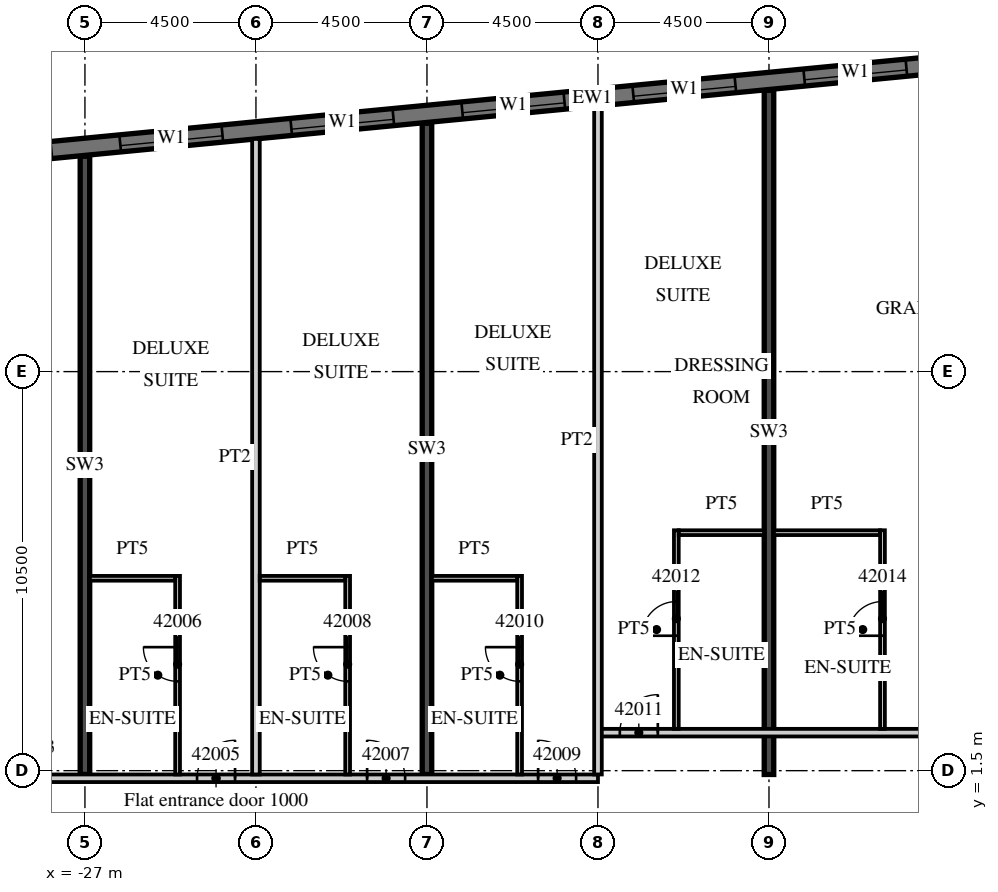
"""IFC4 building model, lengths in metres.
Left out: names, types, materials, properties, quantities, classifications, styles, units other than length and angle.
Written with IfcOpenShell. Run it as: python <this file> out.ifc"""

import sys

from ifc_helpers import new_model, si_unit, direction, frame, frame_2d, origin, place, context, subcontext, project, spatial, rectangle, extrude, element, fill, save


model = new_model("IFC4")
c1 = context("Model", 3, precision=1e-05, world=origin(), true_north=direction((0.0, 1.0)))
c2 = subcontext(c1, "Body", "Model", "MODEL_VIEW")
j1 = project(units=[si_unit("LENGTHUNIT", "METRE"), si_unit("PLANEANGLEUNIT", "RADIAN")], contexts=[c1])
p1 = place(None, origin())
s1 = spatial("IfcSite", under=j1, at=p1, CompositionType="ELEMENT")
p2 = place(p1, origin())
s2 = spatial("IfcBuilding", under=s1, at=p2, CompositionType="ELEMENT")
p3 = place(p2, frame((0.0, 0.0, 180.1)))
s3 = spatial("IfcBuildingStorey", under=s2, at=p3, CompositionType="ELEMENT", Elevation=180.1)
p4 = place(p3, frame((-27.0, 1.4, 0.0), z_axis=(0.0, 0.0, 1.0), x_axis=(0.0, 1.0, 0.0)))
e1 = element("IfcWall", 1, at=p4, inside=s3, PredefinedType="SHEAR", context=c2, shape_type="SweptSolid", body=[
    extrude(rectangle(XDim=16.268, YDim=0.25, at=frame_2d((8.134, 0.0))), origin(), (0.0, 0.0, 1.0), 3.3),
])
p5 = place(p3, frame((-18.0, 1.4, 0.0), z_axis=(0.0, 0.0, 1.0), x_axis=(0.0, 1.0, 0.0)))
e2 = element("IfcWall", 2, at=p5, inside=s3, PredefinedType="SHEAR", context=c2, shape_type="SweptSolid", body=[
    extrude(rectangle(XDim=17.134, YDim=0.25, at=frame_2d((8.567, 0.0))), origin(), (0.0, 0.0, 1.0), 3.3),
])
p6 = place(p3, frame((-9.0, 1.4, 0.0), z_axis=(0.0, 0.0, 1.0), x_axis=(0.0, 1.0, 0.0)))
e3 = element("IfcWall", 3, at=p6, inside=s3, PredefinedType="SHEAR", context=c2, shape_type="SweptSolid", body=[
    extrude(rectangle(XDim=18.001, YDim=0.25, at=frame_2d((9.0, 0.0))), origin(), (0.0, 0.0, 1.0), 3.3),
])
p7 = place(p3, frame((13.521, 21.817, 0.0), z_axis=(0.0, 0.0, 1.0), x_axis=(-0.995396508751, -0.095842529008, 0.0)))
e4 = element("IfcWall", 4, at=p7, inside=s3, PredefinedType="SOLIDWALL", context=c2, shape_type="SweptSolid", body=[
    extrude(rectangle(XDim=54.591, YDim=0.45, at=frame_2d((27.296, 0.0))), origin(), (0.0, 0.0, 1.0), 3.02),
])
p8 = place(p7, frame((0.91, 0.0, 0.45)))
e5 = element("IfcOpeningElement", 5, at=p8, cuts=e4, PredefinedType="OPENING", context=c2, shape_type="SweptSolid", body=[
    extrude(rectangle(XDim=2.7, YDim=2.25, at=frame_2d((1.35, 1.125))), frame((0.0, 0.235, 0.0), z_axis=(0.0, -1.0, 0.0), x_axis=(1.0, 0.0, 0.0)), (0.0, 0.0, 1.0), 0.47),
])
p9 = place(p7, frame((5.431, 0.0, 0.45)))
e6 = element("IfcOpeningElement", 6, at=p9, cuts=e4, PredefinedType="OPENING", context=c2, shape_type="SweptSolid", body=[
    extrude(rectangle(XDim=2.7, YDim=2.25, at=frame_2d((1.35, 1.125))), frame((0.0, 0.235, 0.0), z_axis=(0.0, -1.0, 0.0), x_axis=(1.0, 0.0, 0.0)), (0.0, 0.0, 1.0), 0.47),
])
p10 = place(p7, frame((9.952, 0.0, 0.45)))
e7 = element("IfcOpeningElement", 7, at=p10, cuts=e4, PredefinedType="OPENING", context=c2, shape_type="SweptSolid", body=[
    extrude(rectangle(XDim=2.7, YDim=2.25, at=frame_2d((1.35, 1.125))), frame((0.0, 0.235, 0.0), z_axis=(0.0, -1.0, 0.0), x_axis=(1.0, 0.0, 0.0)), (0.0, 0.0, 1.0), 0.47),
])
p11 = place(p7, frame((14.473, 0.0, 0.45)))
e8 = element("IfcOpeningElement", 8, at=p11, cuts=e4, PredefinedType="OPENING", context=c2, shape_type="SweptSolid", body=[
    extrude(rectangle(XDim=2.7, YDim=2.25, at=frame_2d((1.35, 1.125))), frame((0.0, 0.235, 0.0), z_axis=(0.0, -1.0, 0.0), x_axis=(1.0, 0.0, 0.0)), (0.0, 0.0, 1.0), 0.47),
])
p12 = place(p7, frame((18.994, 0.0, 0.45)))
e9 = element("IfcOpeningElement", 9, at=p12, cuts=e4, PredefinedType="OPENING", context=c2, shape_type="SweptSolid", body=[
    extrude(rectangle(XDim=2.7, YDim=2.25, at=frame_2d((1.35, 1.125))), frame((0.0, 0.235, 0.0), z_axis=(0.0, -1.0, 0.0), x_axis=(1.0, 0.0, 0.0)), (0.0, 0.0, 1.0), 0.47),
])
p13 = place(p7, frame((23.514, 0.0, 0.45)))
e10 = element("IfcOpeningElement", 10, at=p13, cuts=e4, PredefinedType="OPENING", context=c2, shape_type="SweptSolid", body=[
    extrude(rectangle(XDim=2.7, YDim=2.25, at=frame_2d((1.35, 1.125))), frame((0.0, 0.235, 0.0), z_axis=(0.0, -1.0, 0.0), x_axis=(1.0, 0.0, 0.0)), (0.0, 0.0, 1.0), 0.47),
])
p14 = place(p7, frame((28.035, 0.0, 0.45)))
e11 = element("IfcOpeningElement", 11, at=p14, cuts=e4, PredefinedType="OPENING", context=c2, shape_type="SweptSolid", body=[
    extrude(rectangle(XDim=2.7, YDim=2.25, at=frame_2d((1.35, 1.125))), frame((0.0, 0.235, 0.0), z_axis=(0.0, -1.0, 0.0), x_axis=(1.0, 0.0, 0.0)), (0.0, 0.0, 1.0), 0.47),
])
p15 = place(p7, frame((32.556, 0.0, 0.45)))
e12 = element("IfcOpeningElement", 12, at=p15, cuts=e4, PredefinedType="OPENING", context=c2, shape_type="SweptSolid", body=[
    extrude(rectangle(XDim=2.7, YDim=2.25, at=frame_2d((1.35, 1.125))), frame((0.0, 0.235, 0.0), z_axis=(0.0, -1.0, 0.0), x_axis=(1.0, 0.0, 0.0)), (0.0, 0.0, 1.0), 0.47),
])
p16 = place(p7, frame((37.077, 0.0, 0.45)))
e13 = element("IfcOpeningElement", 13, at=p16, cuts=e4, PredefinedType="OPENING", context=c2, shape_type="SweptSolid", body=[
    extrude(rectangle(XDim=2.7, YDim=2.25, at=frame_2d((1.35, 1.125))), frame((0.0, 0.235, 0.0), z_axis=(0.0, -1.0, 0.0), x_axis=(1.0, 0.0, 0.0)), (0.0, 0.0, 1.0), 0.47),
])
p17 = place(p7, frame((41.598, 0.0, 0.45)))
e14 = element("IfcOpeningElement", 14, at=p17, cuts=e4, PredefinedType="OPENING", context=c2, shape_type="SweptSolid", body=[
    extrude(rectangle(XDim=2.7, YDim=2.25, at=frame_2d((1.35, 1.125))), frame((0.0, 0.235, 0.0), z_axis=(0.0, -1.0, 0.0), x_axis=(1.0, 0.0, 0.0)), (0.0, 0.0, 1.0), 0.47),
])
p18 = place(p7, frame((46.118, 0.0, 0.45)))
e15 = element("IfcOpeningElement", 15, at=p18, cuts=e4, PredefinedType="OPENING", context=c2, shape_type="SweptSolid", body=[
    extrude(rectangle(XDim=2.7, YDim=2.25, at=frame_2d((1.35, 1.125))), frame((0.0, 0.235, 0.0), z_axis=(0.0, -1.0, 0.0), x_axis=(1.0, 0.0, 0.0)), (0.0, 0.0, 1.0), 0.47),
])
p19 = place(p7, frame((50.629, 0.0, 0.45)))
e16 = element("IfcOpeningElement", 16, at=p19, cuts=e4, PredefinedType="OPENING", context=c2, shape_type="SweptSolid", body=[
    extrude(rectangle(XDim=2.7, YDim=2.25, at=frame_2d((1.35, 1.125))), frame((0.0, 0.235, 0.0), z_axis=(0.0, -1.0, 0.0), x_axis=(1.0, 0.0, 0.0)), (0.0, 0.0, 1.0), 0.47),
])
p20 = place(p3, frame((-42.913, 1.3, 0.0), z_axis=(0.0, 0.0, 1.0), x_axis=(1.0, 0.0, 0.0)))
e17 = element("IfcWall", 17, at=p20, inside=s3, PredefinedType="PARTITIONING", context=c2, shape_type="SweptSolid", body=[
    extrude(rectangle(XDim=29.413, YDim=0.2, at=frame_2d((14.707, 0.0))), origin(), (0.0, 0.0, 1.0), 3.02),
])
p21 = place(p20, frame((1.406, 0.0, 0.0)))
e18 = element("IfcOpeningElement", 18, at=p21, cuts=e17, PredefinedType="OPENING", context=c2, shape_type="SweptSolid", body=[
    extrude(rectangle(XDim=1.2, YDim=2.1, at=frame_2d((0.6, 1.05))), frame((0.0, 0.11, 0.0), z_axis=(0.0, -1.0, 0.0), x_axis=(1.0, 0.0, 0.0)), (0.0, 0.0, 1.0), 0.22),
])
p22 = place(p20, frame((12.275, 0.0, 0.0)))
e19 = element("IfcOpeningElement", 19, at=p22, cuts=e17, PredefinedType="OPENING", context=c2, shape_type="SweptSolid", body=[
    extrude(rectangle(XDim=1.2, YDim=2.1, at=frame_2d((0.6, 1.05))), frame((0.0, 0.11, 0.0), z_axis=(0.0, -1.0, 0.0), x_axis=(1.0, 0.0, 0.0)), (0.0, 0.0, 1.0), 0.22),
])
p23 = place(p20, frame((18.863, 0.0, 0.0)))
e20 = element("IfcOpeningElement", 20, at=p23, cuts=e17, PredefinedType="OPENING", context=c2, shape_type="SweptSolid", body=[
    extrude(rectangle(XDim=1.0, YDim=2.1, at=frame_2d((0.5, 1.05))), frame((0.0, 0.11, 0.0), z_axis=(0.0, -1.0, 0.0), x_axis=(1.0, 0.0, 0.0)), (0.0, 0.0, 1.0), 0.22),
])
p24 = place(p20, frame((23.338, 0.0, 0.0)))
e21 = element("IfcOpeningElement", 21, at=p24, cuts=e17, PredefinedType="OPENING", context=c2, shape_type="SweptSolid", body=[
    extrude(rectangle(XDim=1.0, YDim=2.1, at=frame_2d((0.5, 1.05))), frame((0.0, 0.11, 0.0), z_axis=(0.0, -1.0, 0.0), x_axis=(1.0, 0.0, 0.0)), (0.0, 0.0, 1.0), 0.22),
])
p25 = place(p20, frame((27.838, 0.0, 0.0)))
e22 = element("IfcOpeningElement", 22, at=p25, cuts=e17, PredefinedType="OPENING", context=c2, shape_type="SweptSolid", body=[
    extrude(rectangle(XDim=1.0, YDim=2.1, at=frame_2d((0.5, 1.05))), frame((0.0, 0.11, 0.0), z_axis=(0.0, -1.0, 0.0), x_axis=(1.0, 0.0, 0.0)), (0.0, 0.0, 1.0), 0.22),
])
p26 = place(p3, frame((-13.5, 2.5, 0.0), z_axis=(0.0, 0.0, 1.0), x_axis=(1.0, 0.0, 0.0)))
e23 = element("IfcWall", 23, at=p26, inside=s3, PredefinedType="PARTITIONING", context=c2, shape_type="SweptSolid", body=[
    extrude(rectangle(XDim=27.0, YDim=0.2, at=frame_2d((13.5, 0.0))), origin(), (0.0, 0.0, 1.0), 3.02),
])
p27 = place(p26, frame((0.575, 0.0, 0.0)))
e24 = element("IfcOpeningElement", 24, at=p27, cuts=e23, PredefinedType="OPENING", context=c2, shape_type="SweptSolid", body=[
    extrude(rectangle(XDim=1.0, YDim=2.1, at=frame_2d((0.5, 1.05))), frame((0.0, 0.11, 0.0), z_axis=(0.0, -1.0, 0.0), x_axis=(1.0, 0.0, 0.0)), (0.0, 0.0, 1.0), 0.22),
])
p28 = place(p26, frame((9.863, 0.0, 0.0)))
e25 = element("IfcOpeningElement", 25, at=p28, cuts=e23, PredefinedType="OPENING", context=c2, shape_type="SweptSolid", body=[
    extrude(rectangle(XDim=1.2, YDim=2.1, at=frame_2d((0.6, 1.05))), frame((0.0, 0.11, 0.0), z_axis=(0.0, -1.0, 0.0), x_axis=(1.0, 0.0, 0.0)), (0.0, 0.0, 1.0), 0.22),
])
p29 = place(p26, frame((15.938, 0.0, 0.0)))
e26 = element("IfcOpeningElement", 26, at=p29, cuts=e23, PredefinedType="OPENING", context=c2, shape_type="SweptSolid", body=[
    extrude(rectangle(XDim=1.2, YDim=2.1, at=frame_2d((0.6, 1.05))), frame((0.0, 0.11, 0.0), z_axis=(0.0, -1.0, 0.0), x_axis=(1.0, 0.0, 0.0)), (0.0, 0.0, 1.0), 0.22),
])
p30 = place(p26, frame((25.425, 0.0, 0.0)))
e27 = element("IfcOpeningElement", 27, at=p30, cuts=e23, PredefinedType="OPENING", context=c2, shape_type="SweptSolid", body=[
    extrude(rectangle(XDim=1.0, YDim=2.1, at=frame_2d((0.5, 1.05))), frame((0.0, 0.11, 0.0), z_axis=(0.0, -1.0, 0.0), x_axis=(1.0, 0.0, 0.0)), (0.0, 0.0, 1.0), 0.22),
])
p31 = place(p3, frame((-22.5, 1.4, 0.0), z_axis=(0.0, 0.0, 1.0), x_axis=(0.0, 1.0, 0.0)))
e28 = element("IfcWall", 28, at=p31, inside=s3, PredefinedType="PARTITIONING", context=c2, shape_type="SweptSolid", body=[
    extrude(rectangle(XDim=16.723, YDim=0.2, at=frame_2d((8.362, 0.0))), origin(), (0.0, 0.0, 1.0), 3.02),
])
p32 = place(p3, frame((-24.562, 1.4, 0.0), z_axis=(0.0, 0.0, 1.0), x_axis=(0.0, 1.0, 0.0)))
e29 = element("IfcWall", 29, at=p32, inside=s3, PredefinedType="PARTITIONING", context=c2, shape_type="SweptSolid", body=[
    extrude(rectangle(XDim=5.225, YDim=0.125, at=frame_2d((2.613, 0.0))), origin(), (0.0, 0.0, 1.0), 3.02),
])
p33 = place(p32, frame((2.45, 0.0, 0.0)))
e30 = element("IfcOpeningElement", 30, at=p33, cuts=e29, PredefinedType="OPENING", context=c2, shape_type="SweptSolid", body=[
    extrude(rectangle(XDim=0.9, YDim=2.1, at=frame_2d((0.45, 1.05))), frame((0.0, 0.073, 0.0), z_axis=(0.0, -1.0, 0.0), x_axis=(1.0, 0.0, 0.0)), (0.0, 0.0, 1.0), 0.145),
])
p34 = place(p3, frame((-26.875, 6.562, 0.0), z_axis=(0.0, 0.0, 1.0), x_axis=(1.0, 0.0, 0.0)))
e31 = element("IfcWall", 31, at=p34, inside=s3, PredefinedType="PARTITIONING", context=c2, shape_type="SweptSolid", body=[
    extrude(rectangle(XDim=2.25, YDim=0.125, at=frame_2d((1.125, 0.0))), origin(), (0.0, 0.0, 1.0), 3.02),
])
p35 = place(p3, frame((-20.087, 1.4, 0.0), z_axis=(0.0, 0.0, 1.0), x_axis=(0.0, 1.0, 0.0)))
e32 = element("IfcWall", 32, at=p35, inside=s3, PredefinedType="PARTITIONING", context=c2, shape_type="SweptSolid", body=[
    extrude(rectangle(XDim=5.225, YDim=0.125, at=frame_2d((2.613, 0.0))), origin(), (0.0, 0.0, 1.0), 3.02),
])
p36 = place(p35, frame((2.45, 0.0, 0.0)))
e33 = element("IfcOpeningElement", 33, at=p36, cuts=e32, PredefinedType="OPENING", context=c2, shape_type="SweptSolid", body=[
    extrude(rectangle(XDim=0.9, YDim=2.1, at=frame_2d((0.45, 1.05))), frame((0.0, 0.073, 0.0), z_axis=(0.0, -1.0, 0.0), x_axis=(1.0, 0.0, 0.0)), (0.0, 0.0, 1.0), 0.145),
])
p37 = place(p3, frame((-22.4, 6.562, 0.0), z_axis=(0.0, 0.0, 1.0), x_axis=(1.0, 0.0, 0.0)))
e34 = element("IfcWall", 34, at=p37, inside=s3, PredefinedType="PARTITIONING", context=c2, shape_type="SweptSolid", body=[
    extrude(rectangle(XDim=2.25, YDim=0.125, at=frame_2d((1.125, 0.0))), origin(), (0.0, 0.0, 1.0), 3.02),
])
p38 = place(p3, frame((-13.5, 1.4, 0.0), z_axis=(0.0, 0.0, 1.0), x_axis=(0.0, 1.0, 0.0)))
e35 = element("IfcWall", 35, at=p38, inside=s3, PredefinedType="PARTITIONING", context=c2, shape_type="SweptSolid", body=[
    extrude(rectangle(XDim=17.59, YDim=0.2, at=frame_2d((8.795, 0.0))), origin(), (0.0, 0.0, 1.0), 3.02),
])
p39 = place(p3, frame((-15.562, 1.4, 0.0), z_axis=(0.0, 0.0, 1.0), x_axis=(0.0, 1.0, 0.0)))
e36 = element("IfcWall", 36, at=p39, inside=s3, PredefinedType="PARTITIONING", context=c2, shape_type="SweptSolid", body=[
    extrude(rectangle(XDim=5.225, YDim=0.125, at=frame_2d((2.613, 0.0))), origin(), (0.0, 0.0, 1.0), 3.02),
])
p40 = place(p39, frame((2.45, 0.0, 0.0)))
e37 = element("IfcOpeningElement", 37, at=p40, cuts=e36, PredefinedType="OPENING", context=c2, shape_type="SweptSolid", body=[
    extrude(rectangle(XDim=0.9, YDim=2.1, at=frame_2d((0.45, 1.05))), frame((0.0, 0.073, 0.0), z_axis=(0.0, -1.0, 0.0), x_axis=(1.0, 0.0, 0.0)), (0.0, 0.0, 1.0), 0.145),
])
p41 = place(p3, frame((-17.875, 6.562, 0.0), z_axis=(0.0, 0.0, 1.0), x_axis=(1.0, 0.0, 0.0)))
e38 = element("IfcWall", 38, at=p41, inside=s3, PredefinedType="PARTITIONING", context=c2, shape_type="SweptSolid", body=[
    extrude(rectangle(XDim=2.25, YDim=0.125, at=frame_2d((1.125, 0.0))), origin(), (0.0, 0.0, 1.0), 3.02),
])
p42 = place(p3, frame((-11.438, 2.6, 0.0), z_axis=(0.0, 0.0, 1.0), x_axis=(0.0, 1.0, 0.0)))
e39 = element("IfcWall", 39, at=p42, inside=s3, PredefinedType="PARTITIONING", context=c2, shape_type="SweptSolid", body=[
    extrude(rectangle(XDim=5.225, YDim=0.125, at=frame_2d((2.612, 0.0))), origin(), (0.0, 0.0, 1.0), 3.02),
])
p43 = place(p42, frame((2.45, 0.0, 0.0)))
e40 = element("IfcOpeningElement", 40, at=p43, cuts=e39, PredefinedType="OPENING", context=c2, shape_type="SweptSolid", body=[
    extrude(rectangle(XDim=0.9, YDim=2.1, at=frame_2d((0.45, 1.05))), frame((0.0, 0.073, 0.0), z_axis=(0.0, -1.0, 0.0), x_axis=(1.0, 0.0, 0.0)), (0.0, 0.0, 1.0), 0.145),
])
p44 = place(p3, frame((-11.375, 7.762, 0.0), z_axis=(0.0, 0.0, 1.0), x_axis=(1.0, 0.0, 0.0)))
e41 = element("IfcWall", 41, at=p44, inside=s3, PredefinedType="PARTITIONING", context=c2, shape_type="SweptSolid", body=[
    extrude(rectangle(XDim=2.25, YDim=0.125, at=frame_2d((1.125, 0.0))), origin(), (0.0, 0.0, 1.0), 3.02),
])
p45 = place(p3, frame((-6.013, 2.6, 0.0), z_axis=(0.0, 0.0, 1.0), x_axis=(0.0, 1.0, 0.0)))
e42 = element("IfcWall", 42, at=p45, inside=s3, PredefinedType="PARTITIONING", context=c2, shape_type="SweptSolid", body=[
    extrude(rectangle(XDim=5.225, YDim=0.125, at=frame_2d((2.612, 0.0))), origin(), (0.0, 0.0, 1.0), 3.02),
])
p46 = place(p45, frame((2.45, 0.0, 0.0)))
e43 = element("IfcOpeningElement", 43, at=p46, cuts=e42, PredefinedType="OPENING", context=c2, shape_type="SweptSolid", body=[
    extrude(rectangle(XDim=0.9, YDim=2.1, at=frame_2d((0.45, 1.05))), frame((0.0, 0.073, 0.0), z_axis=(0.0, -1.0, 0.0), x_axis=(1.0, 0.0, 0.0)), (0.0, 0.0, 1.0), 0.145),
])
p47 = place(p3, frame((-8.875, 7.762, 0.0), z_axis=(0.0, 0.0, 1.0), x_axis=(1.0, 0.0, 0.0)))
e44 = element("IfcWall", 44, at=p47, inside=s3, PredefinedType="PARTITIONING", context=c2, shape_type="SweptSolid", body=[
    extrude(rectangle(XDim=2.8, YDim=0.125, at=frame_2d((1.4, 0.0))), origin(), (0.0, 0.0, 1.0), 3.02),
])
p48 = place(p12, origin())
e45 = element("IfcWindow", 45, at=p48, inside=s3, PartitioningType="SINGLE_PANEL", PredefinedType="WINDOW", context=c2, shape_type="SweptSolid", body=[
    extrude(rectangle(XDim=2.7, YDim=2.25, at=frame_2d((1.35, 1.125))), frame((0.0, 0.09, 0.0), z_axis=(0.0, -1.0, 0.0), x_axis=(1.0, 0.0, 0.0)), (0.0, 0.0, 1.0), 0.06),
])
fill(e9, e45)
p49 = place(p13, origin())
e46 = element("IfcWindow", 46, at=p49, inside=s3, PartitioningType="SINGLE_PANEL", PredefinedType="WINDOW", context=c2, shape_type="SweptSolid", body=[
    extrude(rectangle(XDim=2.7, YDim=2.25, at=frame_2d((1.35, 1.125))), frame((0.0, 0.09, 0.0), z_axis=(0.0, -1.0, 0.0), x_axis=(1.0, 0.0, 0.0)), (0.0, 0.0, 1.0), 0.06),
])
fill(e10, e46)
p50 = place(p14, origin())
e47 = element("IfcWindow", 47, at=p50, inside=s3, PartitioningType="SINGLE_PANEL", PredefinedType="WINDOW", context=c2, shape_type="SweptSolid", body=[
    extrude(rectangle(XDim=2.7, YDim=2.25, at=frame_2d((1.35, 1.125))), frame((0.0, 0.09, 0.0), z_axis=(0.0, -1.0, 0.0), x_axis=(1.0, 0.0, 0.0)), (0.0, 0.0, 1.0), 0.06),
])
fill(e11, e47)
p51 = place(p15, origin())
e48 = element("IfcWindow", 48, at=p51, inside=s3, PartitioningType="SINGLE_PANEL", PredefinedType="WINDOW", context=c2, shape_type="SweptSolid", body=[
    extrude(rectangle(XDim=2.7, YDim=2.25, at=frame_2d((1.35, 1.125))), frame((0.0, 0.09, 0.0), z_axis=(0.0, -1.0, 0.0), x_axis=(1.0, 0.0, 0.0)), (0.0, 0.0, 1.0), 0.06),
])
fill(e12, e48)
p52 = place(p16, origin())
e49 = element("IfcWindow", 49, at=p52, inside=s3, PartitioningType="SINGLE_PANEL", PredefinedType="WINDOW", context=c2, shape_type="SweptSolid", body=[
    extrude(rectangle(XDim=2.7, YDim=2.25, at=frame_2d((1.35, 1.125))), frame((0.0, 0.09, 0.0), z_axis=(0.0, -1.0, 0.0), x_axis=(1.0, 0.0, 0.0)), (0.0, 0.0, 1.0), 0.06),
])
fill(e13, e49)
p53 = place(p23, origin())
e50 = element("IfcDoor", 50, at=p53, inside=s3, OperationType="SINGLE_SWING_RIGHT", PredefinedType="DOOR", context=c2, shape_type="SweptSolid", body=[
    extrude(rectangle(XDim=1.0, YDim=2.1, at=frame_2d((0.5, 1.05))), frame((0.0, 0.025, 0.0), z_axis=(0.0, -1.0, 0.0), x_axis=(1.0, 0.0, 0.0)), (0.0, 0.0, 1.0), 0.05),
])
fill(e20, e50)
p54 = place(p33, origin())
e51 = element("IfcDoor", 51, at=p54, inside=s3, OperationType="SINGLE_SWING_RIGHT", PredefinedType="DOOR", context=c2, shape_type="SweptSolid", body=[
    extrude(rectangle(XDim=0.9, YDim=2.1, at=frame_2d((0.45, 1.05))), frame((0.0, 0.025, 0.0), z_axis=(0.0, -1.0, 0.0), x_axis=(1.0, 0.0, 0.0)), (0.0, 0.0, 1.0), 0.05),
])
fill(e30, e51)
p55 = place(p24, origin())
e52 = element("IfcDoor", 52, at=p55, inside=s3, OperationType="SINGLE_SWING_LEFT", PredefinedType="DOOR", context=c2, shape_type="SweptSolid", body=[
    extrude(rectangle(XDim=1.0, YDim=2.1, at=frame_2d((0.5, 1.05))), frame((0.0, 0.025, 0.0), z_axis=(0.0, -1.0, 0.0), x_axis=(1.0, 0.0, 0.0)), (0.0, 0.0, 1.0), 0.05),
])
fill(e21, e52)
p56 = place(p36, origin())
e53 = element("IfcDoor", 53, at=p56, inside=s3, OperationType="SINGLE_SWING_RIGHT", PredefinedType="DOOR", context=c2, shape_type="SweptSolid", body=[
    extrude(rectangle(XDim=0.9, YDim=2.1, at=frame_2d((0.45, 1.05))), frame((0.0, 0.025, 0.0), z_axis=(0.0, -1.0, 0.0), x_axis=(1.0, 0.0, 0.0)), (0.0, 0.0, 1.0), 0.05),
])
fill(e33, e53)
p57 = place(p25, origin())
e54 = element("IfcDoor", 54, at=p57, inside=s3, OperationType="SINGLE_SWING_LEFT", PredefinedType="DOOR", context=c2, shape_type="SweptSolid", body=[
    extrude(rectangle(XDim=1.0, YDim=2.1, at=frame_2d((0.5, 1.05))), frame((0.0, 0.025, 0.0), z_axis=(0.0, -1.0, 0.0), x_axis=(1.0, 0.0, 0.0)), (0.0, 0.0, 1.0), 0.05),
])
fill(e22, e54)
p58 = place(p40, origin())
e55 = element("IfcDoor", 55, at=p58, inside=s3, OperationType="SINGLE_SWING_RIGHT", PredefinedType="DOOR", context=c2, shape_type="SweptSolid", body=[
    extrude(rectangle(XDim=0.9, YDim=2.1, at=frame_2d((0.45, 1.05))), frame((0.0, 0.025, 0.0), z_axis=(0.0, -1.0, 0.0), x_axis=(1.0, 0.0, 0.0)), (0.0, 0.0, 1.0), 0.05),
])
fill(e37, e55)
p59 = place(p27, origin())
e56 = element("IfcDoor", 56, at=p59, inside=s3, OperationType="SINGLE_SWING_RIGHT", PredefinedType="DOOR", context=c2, shape_type="SweptSolid", body=[
    extrude(rectangle(XDim=1.0, YDim=2.1, at=frame_2d((0.5, 1.05))), frame((0.0, 0.025, 0.0), z_axis=(0.0, -1.0, 0.0), x_axis=(1.0, 0.0, 0.0)), (0.0, 0.0, 1.0), 0.05),
])
fill(e24, e56)
p60 = place(p43, origin())
e57 = element("IfcDoor", 57, at=p60, inside=s3, OperationType="SINGLE_SWING_LEFT", PredefinedType="DOOR", context=c2, shape_type="SweptSolid", body=[
    extrude(rectangle(XDim=0.9, YDim=2.1, at=frame_2d((0.45, 1.05))), frame((0.0, 0.025, 0.0), z_axis=(0.0, -1.0, 0.0), x_axis=(1.0, 0.0, 0.0)), (0.0, 0.0, 1.0), 0.05),
])
fill(e40, e57)
p61 = place(p46, origin())
e58 = element("IfcDoor", 58, at=p61, inside=s3, OperationType="SINGLE_SWING_LEFT", PredefinedType="DOOR", context=c2, shape_type="SweptSolid", body=[
    extrude(rectangle(XDim=0.9, YDim=2.1, at=frame_2d((0.45, 1.05))), frame((0.0, 0.025, 0.0), z_axis=(0.0, -1.0, 0.0), x_axis=(1.0, 0.0, 0.0)), (0.0, 0.0, 1.0), 0.05),
])
fill(e43, e58)
save(model, sys.argv[1])
